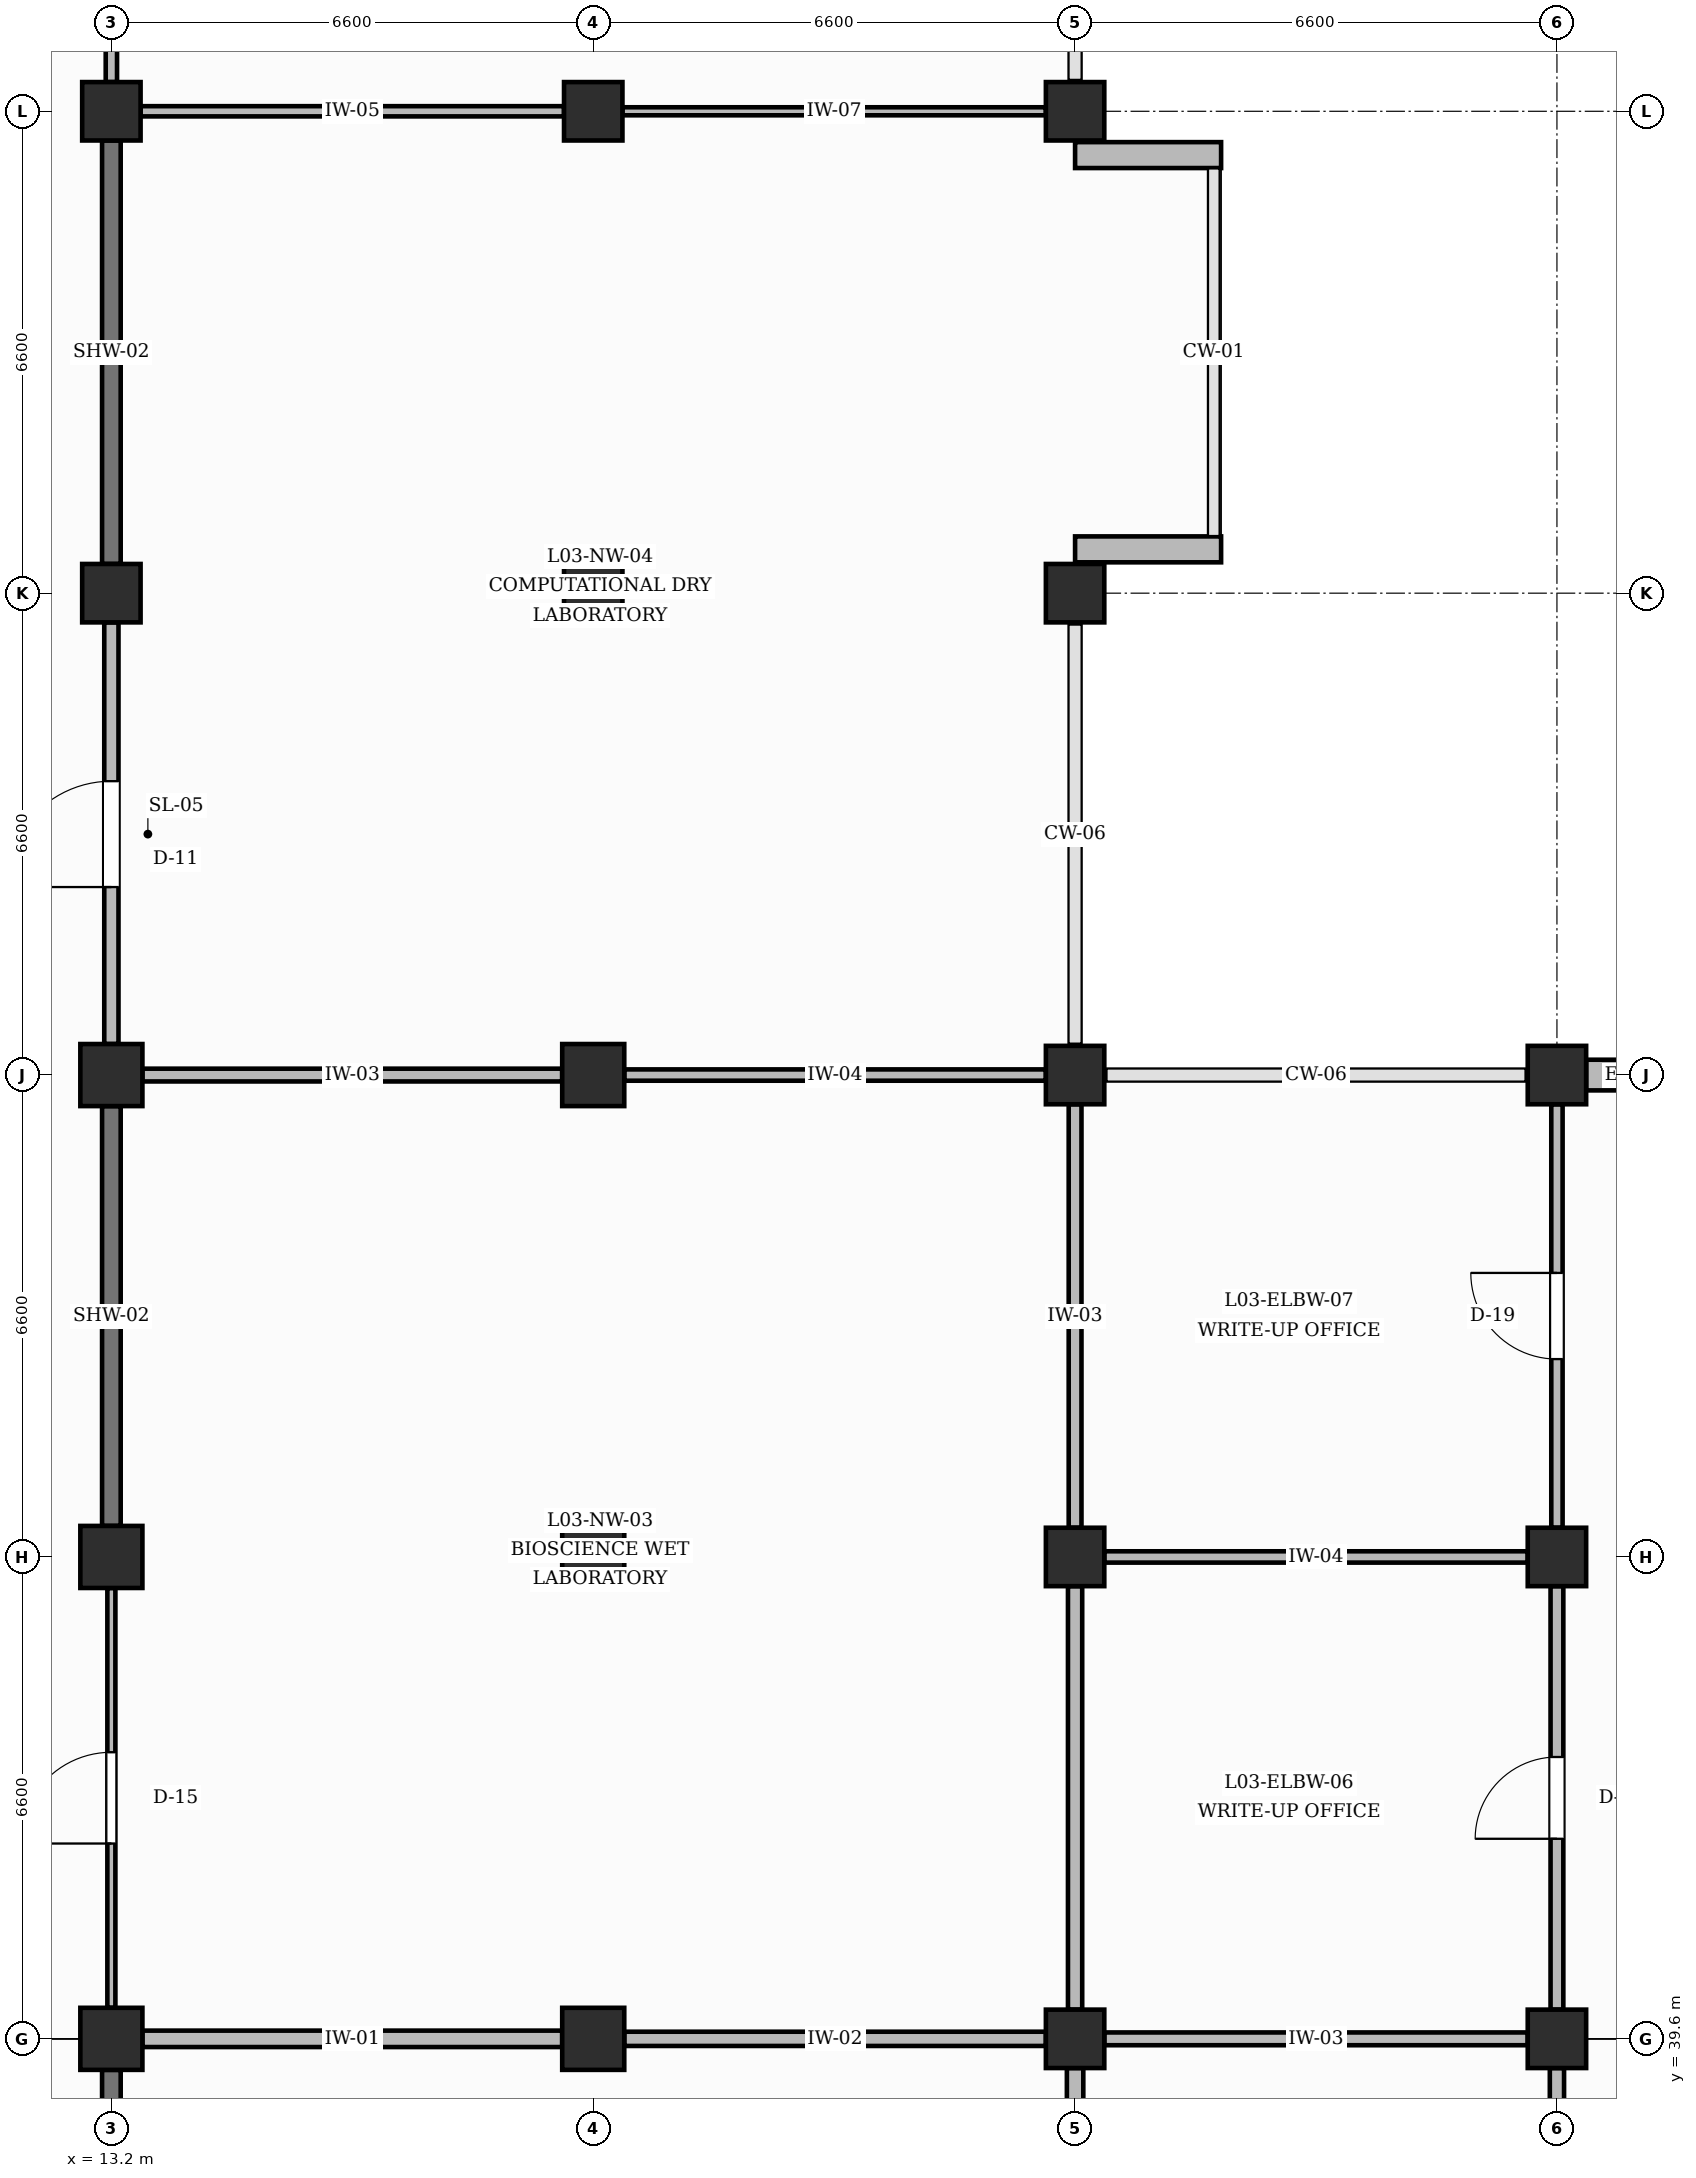
"""IFC4 building model, lengths in metres.
Left out: names, types, materials, properties, quantities, classifications, styles, units other than length and angle.
Written with IfcOpenShell. Run it as: python <this file> out.ifc"""

import sys

from ifc_helpers import new_model, si_unit, direction, frame, frame_2d, origin, origin_2d, place, context, subcontext, project, spatial, rectangle, extrude, element, fill, save


model = new_model("IFC4")
c1 = context("Model", 3, precision=1e-05, world=origin(), true_north=direction((0.0, 1.0)))
c2 = subcontext(c1, "Body", "Model", "MODEL_VIEW")
j1 = project(units=[si_unit("LENGTHUNIT", "METRE"), si_unit("PLANEANGLEUNIT", "RADIAN")], contexts=[c1])
p1 = place(None, origin())
s1 = spatial("IfcSite", under=j1, at=p1, CompositionType="ELEMENT")
p2 = place(p1, origin())
s2 = spatial("IfcBuilding", under=s1, at=p2, CompositionType="ELEMENT")
p3 = place(p2, frame((0.0, 0.0, 14.4)))
s3 = spatial("IfcBuildingStorey", under=s2, at=p3, CompositionType="ELEMENT", Elevation=14.4)
for number, where, z_axis, x_axis in (
    (1, (13.2, 39.6, 0.0), (0.0, 0.0, 1.0), (1.0, 0.0, 0.0)),
    (2, (13.2, 46.2, 0.0), (0.0, 0.0, 1.0), (1.0, 0.0, 0.0)),
    (3, (13.2, 52.8, 0.0), (0.0, 0.0, 1.0), (1.0, 0.0, 0.0)),
):
    element("IfcColumn", number, at=place(p3, frame(where, z_axis=z_axis, x_axis=x_axis)), inside=s3, PredefinedType="COLUMN", context=c2, shape_type="SweptSolid", body=[
        extrude(rectangle(XDim=0.85, YDim=0.85, at=origin_2d()), origin(), (0.0, 0.0, 1.0), 4.2),
    ])
for number, where, z_axis, x_axis in (
    (4, (13.2, 59.4, 0.0), (0.0, 0.0, 1.0), (1.0, 0.0, 0.0)),
    (5, (13.2, 66.0, 0.0), (0.0, 0.0, 1.0), (1.0, 0.0, 0.0)),
):
    element("IfcColumn", number, at=place(p3, frame(where, z_axis=z_axis, x_axis=x_axis)), inside=s3, PredefinedType="COLUMN", context=c2, shape_type="SweptSolid", body=[
        extrude(rectangle(XDim=0.8, YDim=0.8, at=origin_2d()), origin(), (0.0, 0.0, 1.0), 4.2),
    ])
for number, where, z_axis, x_axis in (
    (6, (19.8, 39.6, 0.0), (0.0, 0.0, 1.0), (1.0, 0.0, 0.0)),
    (7, (19.8, 46.2, 0.0), (0.0, 0.0, 1.0), (1.0, 0.0, 0.0)),
    (8, (19.8, 52.8, 0.0), (0.0, 0.0, 1.0), (1.0, 0.0, 0.0)),
):
    element("IfcColumn", number, at=place(p3, frame(where, z_axis=z_axis, x_axis=x_axis)), inside=s3, PredefinedType="COLUMN", context=c2, shape_type="SweptSolid", body=[
        extrude(rectangle(XDim=0.85, YDim=0.85, at=origin_2d()), origin(), (0.0, 0.0, 1.0), 4.2),
    ])
for number, where, z_axis, x_axis in (
    (9, (19.8, 59.4, 0.0), (0.0, 0.0, 1.0), (1.0, 0.0, 0.0)),
    (10, (19.8, 66.0, 0.0), (0.0, 0.0, 1.0), (1.0, 0.0, 0.0)),
    (11, (26.4, 39.6, 0.0), (0.0, 0.0, 1.0), (1.0, 0.0, 0.0)),
    (12, (26.4, 46.2, 0.0), (0.0, 0.0, 1.0), (1.0, 0.0, 0.0)),
    (13, (26.4, 52.8, 0.0), (0.0, 0.0, 1.0), (1.0, 0.0, 0.0)),
    (14, (26.4, 59.4, 0.0), (0.0, 0.0, 1.0), (1.0, 0.0, 0.0)),
    (15, (26.4, 66.0, 0.0), (0.0, 0.0, 1.0), (1.0, 0.0, 0.0)),
    (16, (33.0, 39.6, 0.0), (0.0, 0.0, 1.0), (1.0, 0.0, 0.0)),
    (17, (33.0, 46.2, 0.0), (0.0, 0.0, 1.0), (1.0, 0.0, 0.0)),
    (18, (33.0, 52.8, 0.0), (0.0, 0.0, 1.0), (1.0, 0.0, 0.0)),
):
    element("IfcColumn", number, at=place(p3, frame(where, z_axis=z_axis, x_axis=x_axis)), inside=s3, PredefinedType="COLUMN", context=c2, shape_type="SweptSolid", body=[
        extrude(rectangle(XDim=0.8, YDim=0.8, at=origin_2d()), origin(), (0.0, 0.0, 1.0), 4.2),
    ])
for number, where, z_axis, x_axis in (
    (19, (26.4, 60.0, 0.0), (0.0, 0.0, 1.0), (1.0, 0.0, 0.0)),
    (20, (26.4, 65.4, 0.0), (0.0, 0.0, 1.0), (1.0, 0.0, 0.0)),
):
    element("IfcWall", number, at=place(p3, frame(where, z_axis=z_axis, x_axis=x_axis)), inside=s3, PredefinedType="SOLIDWALL", context=c2, shape_type="SweptSolid", body=[
        extrude(rectangle(XDim=2.0, YDim=0.355, at=frame_2d((1.0, 0.0))), origin(), (0.0, 0.0, 1.0), 3.26),
    ])
p4 = place(p3, frame((33.4, 52.8, 0.0), z_axis=(0.0, 0.0, 1.0), x_axis=(1.0, 0.0, 0.0)))
e21 = element("IfcWall", 21, at=p4, inside=s3, PredefinedType="SOLIDWALL", context=c2, shape_type="SweptSolid", body=[
    extrude(rectangle(XDim=5.8, YDim=0.42, at=frame_2d((2.9, 0.0))), origin(), (0.0, 0.0, 1.0), 3.26),
])
p5 = place(p4, frame((1.78, 0.0, 0.95)))
e22 = element("IfcOpeningElement", 22, at=p5, cuts=e21, PredefinedType="OPENING", context=c2, shape_type="SweptSolid", body=[
    extrude(rectangle(XDim=2.24, YDim=1.96, at=frame_2d((1.12, 0.98))), frame((0.0, 0.22, 0.0), z_axis=(0.0, -1.0, 0.0), x_axis=(1.0, 0.0, 0.0)), (0.0, 0.0, 1.0), 0.44),
])
p6 = place(p3, frame((13.2, 33.425, 0.0), z_axis=(0.0, 0.0, 1.0), x_axis=(0.0, 1.0, 0.0)))
e23 = element("IfcWall", 23, at=p6, inside=s3, PredefinedType="SHEAR", context=c2, shape_type="SweptSolid", body=[
    extrude(rectangle(XDim=5.75, YDim=0.255, at=frame_2d((2.875, 0.0))), origin(), (0.0, 0.0, 1.0), 3.16),
])
p7 = place(p3, frame((13.2, 40.025, 0.0), z_axis=(0.0, 0.0, 1.0), x_axis=(0.0, 1.0, 0.0)))
e24 = element("IfcWall", 24, at=p7, inside=s3, PredefinedType="PARTITIONING", context=c2, shape_type="SweptSolid", body=[
    extrude(rectangle(XDim=5.75, YDim=0.11, at=frame_2d((2.875, 0.0))), origin(), (0.0, 0.0, 1.0), 3.16),
])
p8 = place(p7, frame((2.25, 0.0, 0.0)))
e25 = element("IfcOpeningElement", 25, at=p8, cuts=e24, PredefinedType="OPENING", context=c2, shape_type="SweptSolid", body=[
    extrude(rectangle(XDim=1.25, YDim=2.25, at=frame_2d((0.625, 1.125))), frame((0.0, 0.065, 0.0), z_axis=(0.0, -1.0, 0.0), x_axis=(1.0, 0.0, 0.0)), (0.0, 0.0, 1.0), 0.13),
])
p9 = place(p3, frame((13.2, 46.625, 0.0), z_axis=(0.0, 0.0, 1.0), x_axis=(0.0, 1.0, 0.0)))
e26 = element("IfcWall", 26, at=p9, inside=s3, PredefinedType="SHEAR", context=c2, shape_type="SweptSolid", body=[
    extrude(rectangle(XDim=5.75, YDim=0.255, at=frame_2d((2.875, 0.0))), origin(), (0.0, 0.0, 1.0), 3.16),
])
p10 = place(p3, frame((13.2, 53.225, 0.0), z_axis=(0.0, 0.0, 1.0), x_axis=(0.0, 1.0, 0.0)))
e27 = element("IfcWall", 27, at=p10, inside=s3, PredefinedType="PARTITIONING", context=c2, shape_type="SweptSolid", body=[
    extrude(rectangle(XDim=5.775, YDim=0.195, at=frame_2d((2.887, 0.0))), origin(), (0.0, 0.0, 1.0), 3.16),
])
p11 = place(p10, frame((2.15, 0.0, 0.0)))
e28 = element("IfcOpeningElement", 28, at=p11, cuts=e27, PredefinedType="OPENING", context=c2, shape_type="SweptSolid", body=[
    extrude(rectangle(XDim=1.45, YDim=2.25, at=frame_2d((0.725, 1.125))), frame((0.0, 0.107, 0.0), z_axis=(0.0, -1.0, 0.0), x_axis=(1.0, 0.0, 0.0)), (0.0, 0.0, 1.0), 0.215),
])
p12 = place(p3, frame((13.2, 59.8, 0.0), z_axis=(0.0, 0.0, 1.0), x_axis=(0.0, 1.0, 0.0)))
e29 = element("IfcWall", 29, at=p12, inside=s3, PredefinedType="SHEAR", context=c2, shape_type="SweptSolid", body=[
    extrude(rectangle(XDim=5.8, YDim=0.255, at=frame_2d((2.9, 0.0))), origin(), (0.0, 0.0, 1.0), 3.16),
])
p13 = place(p3, frame((13.2, 66.4, 0.0), z_axis=(0.0, 0.0, 1.0), x_axis=(0.0, 1.0, 0.0)))
e30 = element("IfcWall", 30, at=p13, inside=s3, PredefinedType="PARTITIONING", context=c2, shape_type="SweptSolid", body=[
    extrude(rectangle(XDim=5.8, YDim=0.155, at=frame_2d((2.9, 0.0))), origin(), (0.0, 0.0, 1.0), 3.16),
])
p14 = place(p13, frame((2.36, 0.0, 0.0)))
e31 = element("IfcOpeningElement", 31, at=p14, cuts=e30, PredefinedType="OPENING", context=c2, shape_type="SweptSolid", body=[
    extrude(rectangle(XDim=1.08, YDim=2.15, at=frame_2d((0.54, 1.075))), frame((0.0, 0.087, 0.0), z_axis=(0.0, -1.0, 0.0), x_axis=(1.0, 0.0, 0.0)), (0.0, 0.0, 1.0), 0.175),
])
p15 = place(p3, frame((13.625, 39.6, 0.0), z_axis=(0.0, 0.0, 1.0), x_axis=(1.0, 0.0, 0.0)))
e32 = element("IfcWall", 32, at=p15, inside=s3, PredefinedType="PARTITIONING", context=c2, shape_type="SweptSolid", body=[
    extrude(rectangle(XDim=5.75, YDim=0.225, at=frame_2d((2.875, 0.0))), origin(), (0.0, 0.0, 1.0), 3.16),
])
p16 = place(p3, frame((13.625, 52.8, 0.0), z_axis=(0.0, 0.0, 1.0), x_axis=(1.0, 0.0, 0.0)))
e33 = element("IfcWall", 33, at=p16, inside=s3, PredefinedType="PARTITIONING", context=c2, shape_type="SweptSolid", body=[
    extrude(rectangle(XDim=5.75, YDim=0.175, at=frame_2d((2.875, 0.0))), origin(), (0.0, 0.0, 1.0), 3.16),
])
p17 = place(p3, frame((13.6, 66.0, 0.0), z_axis=(0.0, 0.0, 1.0), x_axis=(1.0, 0.0, 0.0)))
e34 = element("IfcWall", 34, at=p17, inside=s3, PredefinedType="PARTITIONING", context=c2, shape_type="SweptSolid", body=[
    extrude(rectangle(XDim=5.8, YDim=0.14, at=frame_2d((2.9, 0.0))), origin(), (0.0, 0.0, 1.0), 3.16),
])
p18 = place(p3, frame((26.4, 33.4, 0.0), z_axis=(0.0, 0.0, 1.0), x_axis=(0.0, 1.0, 0.0)))
e35 = element("IfcWall", 35, at=p18, inside=s3, PredefinedType="PARTITIONING", context=c2, shape_type="SweptSolid", body=[
    extrude(rectangle(XDim=5.8, YDim=0.225, at=frame_2d((2.9, 0.0))), origin(), (0.0, 0.0, 1.0), 3.16),
])
p19 = place(p3, frame((20.225, 39.6, 0.0), z_axis=(0.0, 0.0, 1.0), x_axis=(1.0, 0.0, 0.0)))
e36 = element("IfcWall", 36, at=p19, inside=s3, PredefinedType="PARTITIONING", context=c2, shape_type="SweptSolid", body=[
    extrude(rectangle(XDim=5.775, YDim=0.195, at=frame_2d((2.887, 0.0))), origin(), (0.0, 0.0, 1.0), 3.16),
])
p20 = place(p3, frame((26.4, 40.0, 0.0), z_axis=(0.0, 0.0, 1.0), x_axis=(0.0, 1.0, 0.0)))
e37 = element("IfcWall", 37, at=p20, inside=s3, PredefinedType="PARTITIONING", context=c2, shape_type="SweptSolid", body=[
    extrude(rectangle(XDim=5.8, YDim=0.195, at=frame_2d((2.9, 0.0))), origin(), (0.0, 0.0, 1.0), 3.16),
])
p21 = place(p3, frame((26.4, 46.6, 0.0), z_axis=(0.0, 0.0, 1.0), x_axis=(0.0, 1.0, 0.0)))
e38 = element("IfcWall", 38, at=p21, inside=s3, PredefinedType="PARTITIONING", context=c2, shape_type="SweptSolid", body=[
    extrude(rectangle(XDim=5.8, YDim=0.175, at=frame_2d((2.9, 0.0))), origin(), (0.0, 0.0, 1.0), 3.16),
])
p22 = place(p3, frame((20.225, 52.8, 0.0), z_axis=(0.0, 0.0, 1.0), x_axis=(1.0, 0.0, 0.0)))
e39 = element("IfcWall", 39, at=p22, inside=s3, PredefinedType="PARTITIONING", context=c2, shape_type="SweptSolid", body=[
    extrude(rectangle(XDim=5.775, YDim=0.155, at=frame_2d((2.887, 0.0))), origin(), (0.0, 0.0, 1.0), 3.16),
])
p23 = place(p3, frame((20.2, 66.0, 0.0), z_axis=(0.0, 0.0, 1.0), x_axis=(1.0, 0.0, 0.0)))
e40 = element("IfcWall", 40, at=p23, inside=s3, PredefinedType="PARTITIONING", context=c2, shape_type="SweptSolid", body=[
    extrude(rectangle(XDim=5.8, YDim=0.11, at=frame_2d((2.9, 0.0))), origin(), (0.0, 0.0, 1.0), 3.41),
])
p24 = place(p3, frame((33.0, 33.4, 0.0), z_axis=(0.0, 0.0, 1.0), x_axis=(0.0, 1.0, 0.0)))
e41 = element("IfcWall", 41, at=p24, inside=s3, PredefinedType="PARTITIONING", context=c2, shape_type="SweptSolid", body=[
    extrude(rectangle(XDim=5.8, YDim=0.195, at=frame_2d((2.9, 0.0))), origin(), (0.0, 0.0, 1.0), 3.16),
])
p25 = place(p24, frame((2.36, 0.0, 0.0)))
e42 = element("IfcOpeningElement", 42, at=p25, cuts=e41, PredefinedType="OPENING", context=c2, shape_type="SweptSolid", body=[
    extrude(rectangle(XDim=1.08, YDim=2.15, at=frame_2d((0.54, 1.075))), frame((0.0, 0.107, 0.0), z_axis=(0.0, -1.0, 0.0), x_axis=(1.0, 0.0, 0.0)), (0.0, 0.0, 1.0), 0.215),
])
p26 = place(p3, frame((26.8, 39.6, 0.0), z_axis=(0.0, 0.0, 1.0), x_axis=(1.0, 0.0, 0.0)))
e43 = element("IfcWall", 43, at=p26, inside=s3, PredefinedType="PARTITIONING", context=c2, shape_type="SweptSolid", body=[
    extrude(rectangle(XDim=5.8, YDim=0.175, at=frame_2d((2.9, 0.0))), origin(), (0.0, 0.0, 1.0), 3.16),
])
p27 = place(p3, frame((33.0, 40.0, 0.0), z_axis=(0.0, 0.0, 1.0), x_axis=(0.0, 1.0, 0.0)))
e44 = element("IfcWall", 44, at=p27, inside=s3, PredefinedType="PARTITIONING", context=c2, shape_type="SweptSolid", body=[
    extrude(rectangle(XDim=5.8, YDim=0.175, at=frame_2d((2.9, 0.0))), origin(), (0.0, 0.0, 1.0), 3.16),
])
p28 = place(p27, frame((2.34, 0.0, 0.0)))
e45 = element("IfcOpeningElement", 45, at=p28, cuts=e44, PredefinedType="OPENING", context=c2, shape_type="SweptSolid", body=[
    extrude(rectangle(XDim=1.12, YDim=2.2, at=frame_2d((0.56, 1.1))), frame((0.0, 0.097, 0.0), z_axis=(0.0, -1.0, 0.0), x_axis=(1.0, 0.0, 0.0)), (0.0, 0.0, 1.0), 0.195),
])
p29 = place(p3, frame((26.8, 46.2, 0.0), z_axis=(0.0, 0.0, 1.0), x_axis=(1.0, 0.0, 0.0)))
e46 = element("IfcWall", 46, at=p29, inside=s3, PredefinedType="PARTITIONING", context=c2, shape_type="SweptSolid", body=[
    extrude(rectangle(XDim=5.8, YDim=0.155, at=frame_2d((2.9, 0.0))), origin(), (0.0, 0.0, 1.0), 3.16),
])
p30 = place(p3, frame((33.0, 46.6, 0.0), z_axis=(0.0, 0.0, 1.0), x_axis=(0.0, 1.0, 0.0)))
e47 = element("IfcWall", 47, at=p30, inside=s3, PredefinedType="PARTITIONING", context=c2, shape_type="SweptSolid", body=[
    extrude(rectangle(XDim=5.8, YDim=0.155, at=frame_2d((2.9, 0.0))), origin(), (0.0, 0.0, 1.0), 3.16),
])
p31 = place(p30, frame((2.31, 0.0, 0.0)))
e48 = element("IfcOpeningElement", 48, at=p31, cuts=e47, PredefinedType="OPENING", context=c2, shape_type="SweptSolid", body=[
    extrude(rectangle(XDim=1.18, YDim=2.2, at=frame_2d((0.59, 1.1))), frame((0.0, 0.087, 0.0), z_axis=(0.0, -1.0, 0.0), x_axis=(1.0, 0.0, 0.0)), (0.0, 0.0, 1.0), 0.175),
])
p32 = place(p28, origin())
e49 = element("IfcDoor", 49, at=p32, inside=s3, OperationType="SINGLE_SWING_LEFT", PredefinedType="DOOR", context=c2, shape_type="SweptSolid", body=[
    extrude(rectangle(XDim=1.12, YDim=2.2, at=frame_2d((0.56, 1.1))), frame((0.0, 0.025, 0.0), z_axis=(0.0, -1.0, 0.0), x_axis=(1.0, 0.0, 0.0)), (0.0, 0.0, 1.0), 0.05),
])
fill(e45, e49)
p33 = place(p31, origin())
e50 = element("IfcDoor", 50, at=p33, inside=s3, OperationType="SINGLE_SWING_RIGHT", PredefinedType="DOOR", context=c2, shape_type="SweptSolid", body=[
    extrude(rectangle(XDim=1.18, YDim=2.2, at=frame_2d((0.59, 1.1))), frame((0.0, 0.025, 0.0), z_axis=(0.0, -1.0, 0.0), x_axis=(1.0, 0.0, 0.0)), (0.0, 0.0, 1.0), 0.05),
])
fill(e48, e50)
p34 = place(p8, origin())
e51 = element("IfcDoor", 51, at=p34, inside=s3, OperationType="SINGLE_SWING_LEFT", PredefinedType="DOOR", context=c2, shape_type="SweptSolid", body=[
    extrude(rectangle(XDim=1.25, YDim=2.25, at=frame_2d((0.625, 1.125))), frame((0.0, 0.025, 0.0), z_axis=(0.0, -1.0, 0.0), x_axis=(1.0, 0.0, 0.0)), (0.0, 0.0, 1.0), 0.05),
])
fill(e25, e51)
p35 = place(p11, origin())
e52 = element("IfcDoor", 52, at=p35, inside=s3, OperationType="SINGLE_SWING_LEFT", PredefinedType="DOOR", context=c2, shape_type="SweptSolid", body=[
    extrude(rectangle(XDim=1.45, YDim=2.25, at=frame_2d((0.725, 1.125))), frame((0.0, 0.025, 0.0), z_axis=(0.0, -1.0, 0.0), x_axis=(1.0, 0.0, 0.0)), (0.0, 0.0, 1.0), 0.05),
])
fill(e28, e52)
save(model, sys.argv[1])
